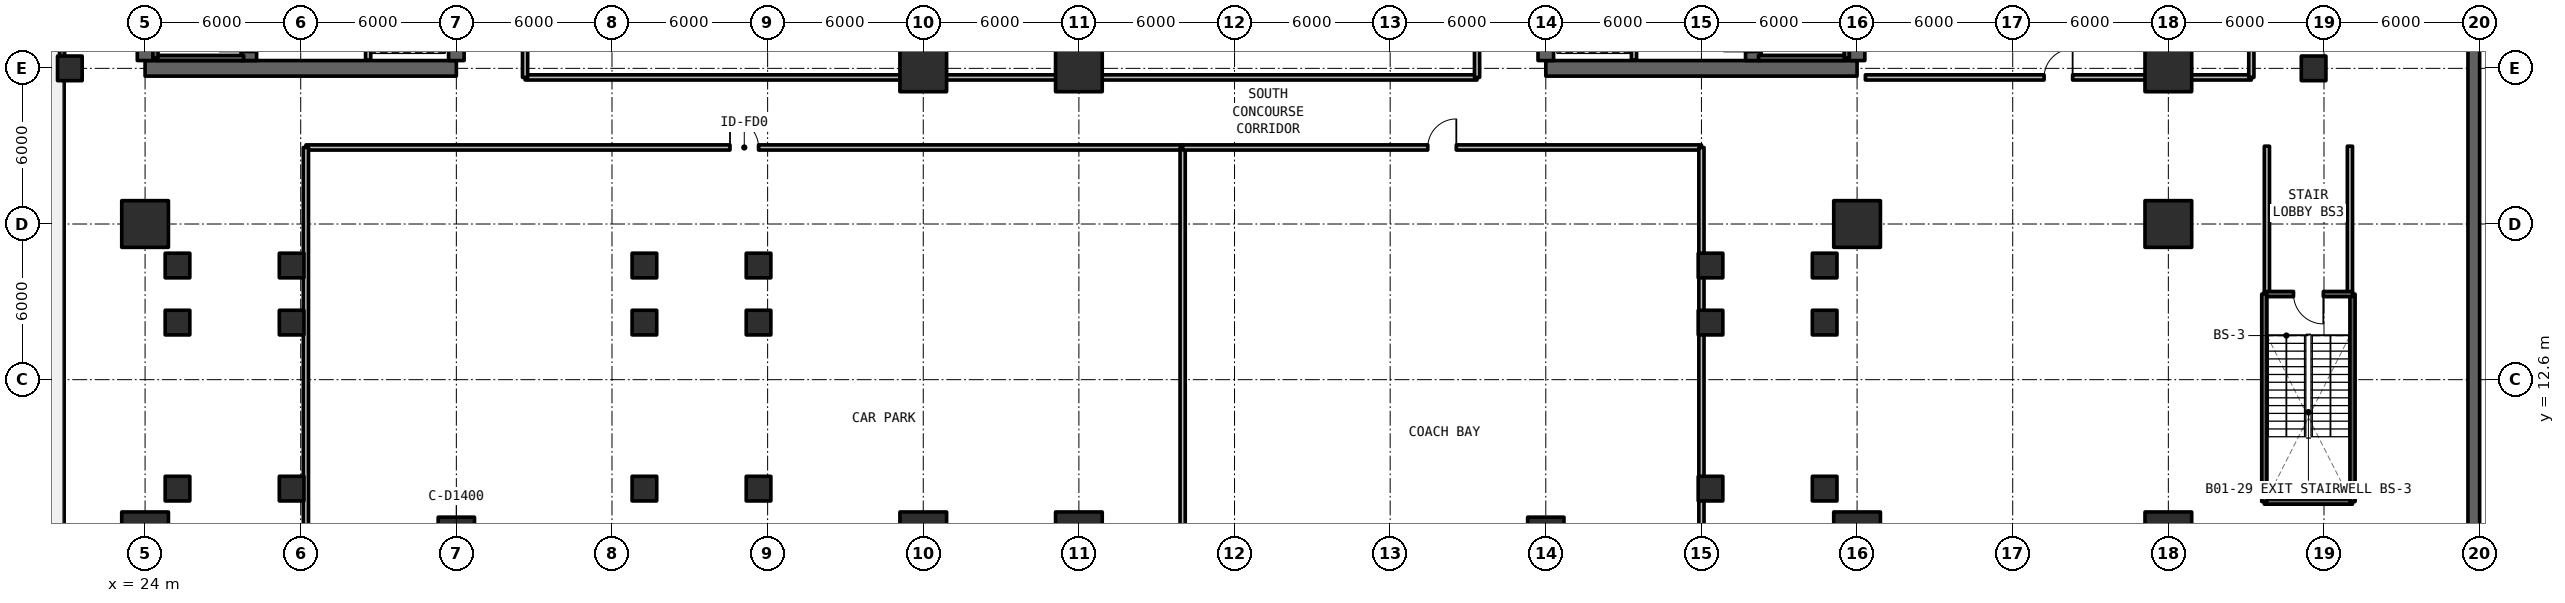
"""IFC4 building model, lengths in metres.
Left out: names, types, materials, properties, quantities, classifications, styles, units other than length and angle.
Written with IfcOpenShell. Run it as: python <this file> out.ifc"""

import sys

from ifc_helpers import new_model, si_unit, direction, frame, frame_2d, origin, origin_2d, place, context, subcontext, project, spatial, rectangle, circle, extrude, element, fill, save


model = new_model("IFC4")
c1 = context("Model", 3, precision=1e-05, world=origin(), true_north=direction((0.0, 1.0)))
c2 = subcontext(c1, "Body", "Model", "MODEL_VIEW")
j1 = project(units=[si_unit("LENGTHUNIT", "METRE"), si_unit("PLANEANGLEUNIT", "RADIAN")], contexts=[c1])
p1 = place(None, origin())
s1 = spatial("IfcSite", under=j1, at=p1, CompositionType="ELEMENT")
p2 = place(p1, origin())
s2 = spatial("IfcBuilding", under=s1, at=p2, CompositionType="ELEMENT")
p3 = place(p2, frame((0.0, 0.0, -4.62)))
s3 = spatial("IfcBuildingStorey", under=s2, at=p3, CompositionType="ELEMENT", Elevation=-4.62)
p4 = place(p3, frame((24.0, 24.6, 0.0), z_axis=(0.0, 0.0, 1.0), x_axis=(1.0, 0.0, 0.0)))
e1 = element("IfcWall", 1, at=p4, inside=s3, PredefinedType="SHEAR", context=c2, shape_type="SweptSolid", body=[
    extrude(rectangle(XDim=12.0, YDim=0.6, at=frame_2d((6.0, 0.0))), origin(), (0.0, 0.0, 1.0), 4.62),
])
p5 = place(p3, frame((24.0, 24.9, 0.0), z_axis=(0.0, 0.0, 1.0), x_axis=(0.0, 1.0, 0.0)))
e2 = element("IfcWall", 2, at=p5, inside=s3, PredefinedType="SHEAR", context=c2, shape_type="SweptSolid", body=[
    extrude(rectangle(XDim=17.4, YDim=0.6, at=frame_2d((8.7, 0.0))), origin(), (0.0, 0.0, 1.0), 4.62),
])
p6 = place(p3, frame((36.0, 24.9, 0.0), z_axis=(0.0, 0.0, 1.0), x_axis=(0.0, 1.0, 0.0)))
e3 = element("IfcWall", 3, at=p6, inside=s3, PredefinedType="SHEAR", context=c2, shape_type="SweptSolid", body=[
    extrude(rectangle(XDim=8.9, YDim=0.6, at=frame_2d((4.45, 0.0))), origin(), (0.0, 0.0, 1.0), 4.62),
])
p7 = place(p3, frame((28.0, 24.9, 0.0), z_axis=(0.0, 0.0, 1.0), x_axis=(0.0, 1.0, 0.0)))
e4 = element("IfcWall", 4, at=p7, inside=s3, PredefinedType="SHEAR", context=c2, shape_type="SweptSolid", body=[
    extrude(rectangle(XDim=17.4, YDim=0.6, at=frame_2d((8.7, 0.0))), origin(), (0.0, 0.0, 1.0), 4.62),
])
p8 = place(p7, frame((0.35, 0.0, 0.0)))
e5 = element("IfcOpeningElement", 5, at=p8, cuts=e4, PredefinedType="OPENING", context=c2, shape_type="SweptSolid", body=[
    extrude(rectangle(XDim=1.15, YDim=2.15, at=frame_2d((0.575, 1.075))), frame((0.0, 0.31, 0.0), z_axis=(0.0, -1.0, 0.0), x_axis=(1.0, 0.0, 0.0)), (0.0, 0.0, 1.0), 0.62),
])
p9 = place(p7, frame((9.55, 0.0, 0.0)))
e6 = element("IfcOpeningElement", 6, at=p9, cuts=e4, PredefinedType="OPENING", context=c2, shape_type="SweptSolid", body=[
    extrude(rectangle(XDim=1.15, YDim=2.15, at=frame_2d((0.575, 1.075))), frame((0.0, 0.31, 0.0), z_axis=(0.0, -1.0, 0.0), x_axis=(1.0, 0.0, 0.0)), (0.0, 0.0, 1.0), 0.62),
])
p10 = place(p3, frame((78.0, 24.6, 0.0), z_axis=(0.0, 0.0, 1.0), x_axis=(1.0, 0.0, 0.0)))
e7 = element("IfcWall", 7, at=p10, inside=s3, PredefinedType="SHEAR", context=c2, shape_type="SweptSolid", body=[
    extrude(rectangle(XDim=12.0, YDim=0.6, at=frame_2d((6.0, 0.0))), origin(), (0.0, 0.0, 1.0), 4.62),
])
p11 = place(p3, frame((90.0, 24.9, 0.0), z_axis=(0.0, 0.0, 1.0), x_axis=(0.0, 1.0, 0.0)))
e8 = element("IfcWall", 8, at=p11, inside=s3, PredefinedType="SHEAR", context=c2, shape_type="SweptSolid", body=[
    extrude(rectangle(XDim=17.4, YDim=0.6, at=frame_2d((8.7, 0.0))), origin(), (0.0, 0.0, 1.0), 4.62),
])
p12 = place(p3, frame((78.0, 24.9, 0.0), z_axis=(0.0, 0.0, 1.0), x_axis=(0.0, 1.0, 0.0)))
e9 = element("IfcWall", 9, at=p12, inside=s3, PredefinedType="SHEAR", context=c2, shape_type="SweptSolid", body=[
    extrude(rectangle(XDim=8.9, YDim=0.6, at=frame_2d((4.45, 0.0))), origin(), (0.0, 0.0, 1.0), 4.62),
])
p13 = place(p3, frame((86.0, 24.9, 0.0), z_axis=(0.0, 0.0, 1.0), x_axis=(0.0, 1.0, 0.0)))
e10 = element("IfcWall", 10, at=p13, inside=s3, PredefinedType="SHEAR", context=c2, shape_type="SweptSolid", body=[
    extrude(rectangle(XDim=17.4, YDim=0.6, at=frame_2d((8.7, 0.0))), origin(), (0.0, 0.0, 1.0), 4.62),
])
p14 = place(p13, frame((0.35, 0.0, 0.0)))
e11 = element("IfcOpeningElement", 11, at=p14, cuts=e10, PredefinedType="OPENING", context=c2, shape_type="SweptSolid", body=[
    extrude(rectangle(XDim=1.15, YDim=2.15, at=frame_2d((0.575, 1.075))), frame((0.0, 0.31, 0.0), z_axis=(0.0, -1.0, 0.0), x_axis=(1.0, 0.0, 0.0)), (0.0, 0.0, 1.0), 0.62),
])
p15 = place(p13, frame((9.55, 0.0, 0.0)))
e12 = element("IfcOpeningElement", 12, at=p15, cuts=e10, PredefinedType="OPENING", context=c2, shape_type="SweptSolid", body=[
    extrude(rectangle(XDim=1.15, YDim=2.15, at=frame_2d((0.575, 1.075))), frame((0.0, 0.31, 0.0), z_axis=(0.0, -1.0, 0.0), x_axis=(1.0, 0.0, 0.0)), (0.0, 0.0, 1.0), 0.62),
])
p16 = place(p3, frame((24.0, 6.6, 0.0), z_axis=(0.0, 0.0, 1.0), x_axis=(1.0, 0.0, 0.0)))
e13 = element("IfcColumn", 13, at=p16, inside=s3, PredefinedType="COLUMN", context=c2, shape_type="SweptSolid", body=[
    extrude(rectangle(XDim=1.8, YDim=1.8, at=origin_2d()), origin(), (0.0, 0.0, 1.0), 4.62),
])
p17 = place(p3, frame((36.0, 6.6, 0.0), z_axis=(0.0, 0.0, 1.0), x_axis=(1.0, 0.0, 0.0)))
e14 = element("IfcColumn", 14, at=p17, inside=s3, PredefinedType="COLUMN", context=c2, shape_type="SweptSolid", body=[
    extrude(circle(Radius=0.7, at=origin_2d()), origin(), (0.0, 0.0, 1.0), 4.62),
])
for number, where, z_axis, x_axis in (
    (15, (54.0, 6.6, 0.0), (0.0, 0.0, 1.0), (1.0, 0.0, 0.0)),
    (16, (54.0, 24.6, 0.0), (0.0, 0.0, 1.0), (1.0, 0.0, 0.0)),
    (17, (60.0, 6.6, 0.0), (0.0, 0.0, 1.0), (1.0, 0.0, 0.0)),
    (18, (60.0, 24.6, 0.0), (0.0, 0.0, 1.0), (1.0, 0.0, 0.0)),
):
    element("IfcColumn", number, at=place(p3, frame(where, z_axis=z_axis, x_axis=x_axis)), inside=s3, PredefinedType="COLUMN", context=c2, shape_type="SweptSolid", body=[
        extrude(rectangle(XDim=1.8, YDim=1.8, at=origin_2d()), origin(), (0.0, 0.0, 1.0), 4.62),
    ])
p18 = place(p3, frame((78.0, 6.6, 0.0), z_axis=(0.0, 0.0, 1.0), x_axis=(1.0, 0.0, 0.0)))
e19 = element("IfcColumn", 19, at=p18, inside=s3, PredefinedType="COLUMN", context=c2, shape_type="SweptSolid", body=[
    extrude(circle(Radius=0.7, at=origin_2d()), origin(), (0.0, 0.0, 1.0), 4.62),
])
for number, where, z_axis, x_axis in (
    (20, (90.0, 6.6, 0.0), (0.0, 0.0, 1.0), (1.0, 0.0, 0.0)),
    (21, (102.0, 6.6, 0.0), (0.0, 0.0, 1.0), (1.0, 0.0, 0.0)),
    (22, (102.0, 24.6, 0.0), (0.0, 0.0, 1.0), (1.0, 0.0, 0.0)),
    (23, (24.0, 18.6, 0.0), (0.0, 0.0, 1.0), (1.0, 0.0, 0.0)),
    (24, (90.0, 18.6, 0.0), (0.0, 0.0, 1.0), (1.0, 0.0, 0.0)),
    (25, (102.0, 18.6, 0.0), (0.0, 0.0, 1.0), (1.0, 0.0, 0.0)),
):
    element("IfcColumn", number, at=place(p3, frame(where, z_axis=z_axis, x_axis=x_axis)), inside=s3, PredefinedType="COLUMN", context=c2, shape_type="SweptSolid", body=[
        extrude(rectangle(XDim=1.8, YDim=1.8, at=origin_2d()), origin(), (0.0, 0.0, 1.0), 4.62),
    ])
for number, where, z_axis, x_axis in (
    (26, (107.6, 24.6, 0.0), (0.0, 0.0, 1.0), (1.0, 0.0, 0.0)),
    (27, (21.1, 24.6, 0.0), (0.0, 0.0, 1.0), (1.0, 0.0, 0.0)),
    (28, (25.25, 14.8, 0.0), (0.0, 0.0, 1.0), (1.0, 0.0, 0.0)),
    (29, (29.65, 14.8, 0.0), (0.0, 0.0, 1.0), (1.0, 0.0, 0.0)),
    (30, (25.25, 8.4, 0.0), (0.0, 0.0, 1.0), (1.0, 0.0, 0.0)),
    (31, (29.65, 8.4, 0.0), (0.0, 0.0, 1.0), (1.0, 0.0, 0.0)),
    (32, (29.65, 17.0, 0.0), (0.0, 0.0, 1.0), (1.0, 0.0, 0.0)),
    (33, (25.25, 17.0, 0.0), (0.0, 0.0, 1.0), (1.0, 0.0, 0.0)),
    (34, (43.25, 14.8, 0.0), (0.0, 0.0, 1.0), (1.0, 0.0, 0.0)),
    (35, (47.65, 14.8, 0.0), (0.0, 0.0, 1.0), (1.0, 0.0, 0.0)),
    (36, (43.25, 8.4, 0.0), (0.0, 0.0, 1.0), (1.0, 0.0, 0.0)),
    (37, (47.65, 8.4, 0.0), (0.0, 0.0, 1.0), (1.0, 0.0, 0.0)),
    (38, (47.65, 17.0, 0.0), (0.0, 0.0, 1.0), (1.0, 0.0, 0.0)),
    (39, (43.25, 17.0, 0.0), (0.0, 0.0, 1.0), (1.0, 0.0, 0.0)),
    (40, (84.35, 14.8, 0.0), (0.0, 0.0, 1.0), (1.0, 0.0, 0.0)),
    (41, (88.75, 14.8, 0.0), (0.0, 0.0, 1.0), (1.0, 0.0, 0.0)),
    (42, (84.35, 8.4, 0.0), (0.0, 0.0, 1.0), (1.0, 0.0, 0.0)),
    (43, (88.75, 8.4, 0.0), (0.0, 0.0, 1.0), (1.0, 0.0, 0.0)),
    (44, (88.75, 17.0, 0.0), (0.0, 0.0, 1.0), (1.0, 0.0, 0.0)),
    (45, (84.35, 17.0, 0.0), (0.0, 0.0, 1.0), (1.0, 0.0, 0.0)),
):
    element("IfcColumn", number, at=place(p3, frame(where, z_axis=z_axis, x_axis=x_axis)), inside=s3, PredefinedType="COLUMN", context=c2, shape_type="SweptSolid", body=[
        extrude(rectangle(XDim=0.95, YDim=0.95, at=origin_2d()), origin(), (0.0, 0.0, 1.0), 4.34),
    ])
p19 = place(p3, frame((113.775, 0.225, 0.0), z_axis=(0.0, 0.0, 1.0), x_axis=(0.0, 1.0, 0.0)))
e46 = element("IfcWall", 46, at=p19, inside=s3, PredefinedType="USERDEFINED", context=c2, shape_type="SweptSolid", body=[
    extrude(rectangle(XDim=66.75, YDim=0.45, at=frame_2d((33.375, 0.0))), origin(), (0.0, 0.0, 1.0), 4.34),
])
p20 = place(p3, frame((32.6, 24.92, 0.0), z_axis=(0.0, 0.0, 1.0), x_axis=(0.0, 1.0, 0.0)))
e47 = element("IfcWall", 47, at=p20, inside=s3, PredefinedType="SOLIDWALL", context=c2, shape_type="SweptSolid", body=[
    extrude(rectangle(XDim=3.58, YDim=0.2, at=frame_2d((1.79, 0.0))), origin(), (0.0, 0.0, 1.0), 3.56),
])
p21 = place(p20, frame((1.3, 0.0, 0.0)))
e48 = element("IfcOpeningElement", 48, at=p21, cuts=e47, PredefinedType="OPENING", context=c2, shape_type="SweptSolid", body=[
    extrude(rectangle(XDim=1.1, YDim=2.2, at=frame_2d((0.55, 1.1))), frame((0.0, 0.11, 0.0), z_axis=(0.0, -1.0, 0.0), x_axis=(1.0, 0.0, 0.0)), (0.0, 0.0, 1.0), 0.22),
])
p22 = place(p3, frame((81.4, 24.92, 0.0), z_axis=(0.0, 0.0, 1.0), x_axis=(0.0, 1.0, 0.0)))
e49 = element("IfcWall", 49, at=p22, inside=s3, PredefinedType="SOLIDWALL", context=c2, shape_type="SweptSolid", body=[
    extrude(rectangle(XDim=3.58, YDim=0.2, at=frame_2d((1.79, 0.0))), origin(), (0.0, 0.0, 1.0), 3.56),
])
p23 = place(p22, frame((1.3, 0.0, 0.0)))
e50 = element("IfcOpeningElement", 50, at=p23, cuts=e49, PredefinedType="OPENING", context=c2, shape_type="SweptSolid", body=[
    extrude(rectangle(XDim=1.1, YDim=2.2, at=frame_2d((0.55, 1.1))), frame((0.0, 0.11, 0.0), z_axis=(0.0, -1.0, 0.0), x_axis=(1.0, 0.0, 0.0)), (0.0, 0.0, 1.0), 0.22),
])
for number, where, z_axis, x_axis in (
    (51, (105.8, 15.9, 0.0), (0.0, 0.0, 1.0), (0.0, 1.0, 0.0)),
    (52, (109.0, 15.9, 0.0), (0.0, 0.0, 1.0), (0.0, 1.0, 0.0)),
):
    element("IfcWall", number, at=place(p3, frame(where, z_axis=z_axis, x_axis=x_axis)), inside=s3, PredefinedType="SOLIDWALL", context=c2, shape_type="SweptSolid", body=[
        extrude(rectangle(XDim=5.7, YDim=0.2, at=frame_2d((2.85, 0.0))), origin(), (0.0, 0.0, 1.0), 3.56),
    ])
p24 = place(p3, frame((30.2, 21.55, 0.0), z_axis=(0.0, 0.0, 1.0), x_axis=(1.0, 0.0, 0.0)))
e53 = element("IfcWall", 53, at=p24, inside=s3, PredefinedType="SOLIDWALL", context=c2, shape_type="SweptSolid", body=[
    extrude(rectangle(XDim=33.8, YDim=0.2, at=frame_2d((16.9, 0.0))), origin(), (0.0, 0.0, 1.0), 3.56),
])
p25 = place(p24, frame((16.35, 0.0, 0.0)))
e54 = element("IfcOpeningElement", 54, at=p25, cuts=e53, PredefinedType="OPENING", context=c2, shape_type="SweptSolid", body=[
    extrude(rectangle(XDim=1.1, YDim=2.15, at=frame_2d((0.55, 1.075))), frame((0.0, 0.11, 0.0), z_axis=(0.0, -1.0, 0.0), x_axis=(1.0, 0.0, 0.0)), (0.0, 0.0, 1.0), 0.22),
])
for number, where, z_axis, x_axis in (
    (55, (30.2, 0.45, 0.0), (0.0, 0.0, 1.0), (0.0, 1.0, 0.0)),
    (56, (64.0, 0.45, 0.0), (0.0, 0.0, 1.0), (0.0, 1.0, 0.0)),
):
    element("IfcWall", number, at=place(p3, frame(where, z_axis=z_axis, x_axis=x_axis)), inside=s3, PredefinedType="SOLIDWALL", context=c2, shape_type="SweptSolid", body=[
        extrude(rectangle(XDim=21.1, YDim=0.2, at=frame_2d((10.55, 0.0))), origin(), (0.0, 0.0, 1.0), 3.56),
    ])
p26 = place(p3, frame((64.0, 21.55, 0.0), z_axis=(0.0, 0.0, 1.0), x_axis=(1.0, 0.0, 0.0)))
e57 = element("IfcWall", 57, at=p26, inside=s3, PredefinedType="SOLIDWALL", context=c2, shape_type="SweptSolid", body=[
    extrude(rectangle(XDim=20.0, YDim=0.2, at=frame_2d((10.0, 0.0))), origin(), (0.0, 0.0, 1.0), 3.56),
])
p27 = place(p26, frame((9.45, 0.0, 0.0)))
e58 = element("IfcOpeningElement", 58, at=p27, cuts=e57, PredefinedType="OPENING", context=c2, shape_type="SweptSolid", body=[
    extrude(rectangle(XDim=1.1, YDim=2.15, at=frame_2d((0.55, 1.075))), frame((0.0, 0.11, 0.0), z_axis=(0.0, -1.0, 0.0), x_axis=(1.0, 0.0, 0.0)), (0.0, 0.0, 1.0), 0.22),
])
p28 = place(p3, frame((84.0, 0.45, 0.0), z_axis=(0.0, 0.0, 1.0), x_axis=(0.0, 1.0, 0.0)))
e59 = element("IfcWall", 59, at=p28, inside=s3, PredefinedType="SOLIDWALL", context=c2, shape_type="SweptSolid", body=[
    extrude(rectangle(XDim=21.1, YDim=0.2, at=frame_2d((10.55, 0.0))), origin(), (0.0, 0.0, 1.0), 3.56),
])
p29 = place(p3, frame((90.32, 24.25, 0.0), z_axis=(0.0, 0.0, 1.0), x_axis=(1.0, 0.0, 0.0)))
e60 = element("IfcWall", 60, at=p29, inside=s3, PredefinedType="SOLIDWALL", context=c2, shape_type="SweptSolid", body=[
    extrude(rectangle(XDim=14.88, YDim=0.2, at=frame_2d((7.44, 0.0))), origin(), (0.0, 0.0, 1.0), 3.56),
])
p30 = place(p29, frame((6.89, 0.0, 0.0)))
e61 = element("IfcOpeningElement", 61, at=p30, cuts=e60, PredefinedType="OPENING", context=c2, shape_type="SweptSolid", body=[
    extrude(rectangle(XDim=1.1, YDim=2.15, at=frame_2d((0.55, 1.075))), frame((0.0, 0.11, 0.0), z_axis=(0.0, -1.0, 0.0), x_axis=(1.0, 0.0, 0.0)), (0.0, 0.0, 1.0), 0.22),
])
p31 = place(p3, frame((105.2, 24.25, 0.0), z_axis=(0.0, 0.0, 1.0), x_axis=(0.0, 1.0, 0.0)))
e62 = element("IfcWall", 62, at=p31, inside=s3, PredefinedType="SOLIDWALL", context=c2, shape_type="SweptSolid", body=[
    extrude(rectangle(XDim=18.7, YDim=0.2, at=frame_2d((9.35, 0.0))), origin(), (0.0, 0.0, 1.0), 3.56),
])
p32 = place(p3, frame((38.65, 24.25, 0.0), z_axis=(0.0, 0.0, 1.0), x_axis=(1.0, 0.0, 0.0)))
e63 = element("IfcWall", 63, at=p32, inside=s3, PredefinedType="SOLIDWALL", context=c2, shape_type="SweptSolid", body=[
    extrude(rectangle(XDim=36.7, YDim=0.2, at=frame_2d((18.35, 0.0))), origin(), (0.0, 0.0, 1.0), 3.56),
])
p33 = place(p3, frame((38.65, 24.25, 0.0), z_axis=(0.0, 0.0, 1.0), x_axis=(0.0, 1.0, 0.0)))
e64 = element("IfcWall", 64, at=p33, inside=s3, PredefinedType="SOLIDWALL", context=c2, shape_type="SweptSolid", body=[
    extrude(rectangle(XDim=18.7, YDim=0.2, at=frame_2d((9.35, 0.0))), origin(), (0.0, 0.0, 1.0), 3.56),
])
p34 = place(p33, frame((8.45, 0.0, 0.0)))
e65 = element("IfcOpeningElement", 65, at=p34, cuts=e64, PredefinedType="OPENING", context=c2, shape_type="SweptSolid", body=[
    extrude(rectangle(XDim=1.1, YDim=2.15, at=frame_2d((0.55, 1.075))), frame((0.0, 0.11, 0.0), z_axis=(0.0, -1.0, 0.0), x_axis=(1.0, 0.0, 0.0)), (0.0, 0.0, 1.0), 0.22),
])
p35 = place(p3, frame((75.35, 24.25, 0.0), z_axis=(0.0, 0.0, 1.0), x_axis=(0.0, 1.0, 0.0)))
e66 = element("IfcWall", 66, at=p35, inside=s3, PredefinedType="SOLIDWALL", context=c2, shape_type="SweptSolid", body=[
    extrude(rectangle(XDim=18.7, YDim=0.2, at=frame_2d((9.35, 0.0))), origin(), (0.0, 0.0, 1.0), 3.56),
])
p36 = place(p3, frame((24.4, 25.0, 0.0), z_axis=(0.0, 0.0, 1.0), x_axis=(1.0, 0.0, 0.0)))
e67 = element("IfcWall", 67, at=p36, inside=s3, PredefinedType="SOLIDWALL", context=c2, shape_type="SweptSolid", body=[
    extrude(rectangle(XDim=3.4, YDim=0.2, at=frame_2d((1.7, 0.0))), origin(), (0.0, 0.0, 1.0), 4.62),
])
p37 = place(p3, frame((24.4, 33.0, 0.0), z_axis=(0.0, 0.0, 1.0), x_axis=(0.0, -1.0, 0.0)))
e68 = element("IfcWall", 68, at=p37, inside=s3, PredefinedType="SOLIDWALL", context=c2, shape_type="SweptSolid", body=[
    extrude(rectangle(XDim=8.0, YDim=0.2, at=frame_2d((4.0, 0.0))), origin(), (0.0, 0.0, 1.0), 4.62),
])
p38 = place(p3, frame((86.2, 25.0, 0.0), z_axis=(0.0, 0.0, 1.0), x_axis=(1.0, 0.0, 0.0)))
e69 = element("IfcWall", 69, at=p38, inside=s3, PredefinedType="SOLIDWALL", context=c2, shape_type="SweptSolid", body=[
    extrude(rectangle(XDim=3.4, YDim=0.2, at=frame_2d((1.7, 0.0))), origin(), (0.0, 0.0, 1.0), 4.62),
])
p39 = place(p3, frame((89.6, 25.0, 0.0), z_axis=(0.0, 0.0, 1.0), x_axis=(0.0, 1.0, 0.0)))
e70 = element("IfcWall", 70, at=p39, inside=s3, PredefinedType="SOLIDWALL", context=c2, shape_type="SweptSolid", body=[
    extrude(rectangle(XDim=8.0, YDim=0.2, at=frame_2d((4.0, 0.0))), origin(), (0.0, 0.0, 1.0), 4.62),
])
p40 = place(p3, frame((105.7, 7.9, 0.0), z_axis=(0.0, 0.0, 1.0), x_axis=(1.0, 0.0, 0.0)))
e71 = element("IfcWall", 71, at=p40, inside=s3, PredefinedType="SOLIDWALL", context=c2, shape_type="SweptSolid", body=[
    extrude(rectangle(XDim=3.4, YDim=0.2, at=frame_2d((1.7, 0.0))), origin(), (0.0, 0.0, 1.0), 4.62),
])
p41 = place(p3, frame((109.1, 7.9, 0.0), z_axis=(0.0, 0.0, 1.0), x_axis=(0.0, 1.0, 0.0)))
e72 = element("IfcWall", 72, at=p41, inside=s3, PredefinedType="SOLIDWALL", context=c2, shape_type="SweptSolid", body=[
    extrude(rectangle(XDim=8.0, YDim=0.2, at=frame_2d((4.0, 0.0))), origin(), (0.0, 0.0, 1.0), 4.62),
])
p42 = place(p3, frame((109.1, 15.9, 0.0), z_axis=(0.0, 0.0, 1.0), x_axis=(-1.0, 0.0, 0.0)))
e73 = element("IfcWall", 73, at=p42, inside=s3, PredefinedType="SOLIDWALL", context=c2, shape_type="SweptSolid", body=[
    extrude(rectangle(XDim=3.4, YDim=0.2, at=frame_2d((1.7, 0.0))), origin(), (0.0, 0.0, 1.0), 4.62),
])
p43 = place(p42, frame((1.125, 0.0, 0.0)))
e74 = element("IfcOpeningElement", 74, at=p43, cuts=e73, PredefinedType="OPENING", context=c2, shape_type="SweptSolid", body=[
    extrude(rectangle(XDim=1.15, YDim=2.15, at=frame_2d((0.575, 1.075))), frame((0.0, 0.11, 0.0), z_axis=(0.0, -1.0, 0.0), x_axis=(1.0, 0.0, 0.0)), (0.0, 0.0, 1.0), 0.22),
])
p44 = place(p3, frame((105.7, 15.9, 0.0), z_axis=(0.0, 0.0, 1.0), x_axis=(0.0, -1.0, 0.0)))
e75 = element("IfcWall", 75, at=p44, inside=s3, PredefinedType="SOLIDWALL", context=c2, shape_type="SweptSolid", body=[
    extrude(rectangle(XDim=8.0, YDim=0.2, at=frame_2d((4.0, 0.0))), origin(), (0.0, 0.0, 1.0), 4.62),
])
p45 = place(p3, frame((20.8, 24.8, 0.0), z_axis=(0.0, 0.0, 1.0), x_axis=(0.0, 1.0, 0.0)))
e76 = element("IfcWall", 76, at=p45, inside=s3, PredefinedType="SOLIDWALL", context=c2, shape_type="SweptSolid", body=[
    extrude(rectangle(XDim=5.6, YDim=0.2, at=frame_2d((2.8, 0.0))), origin(), (0.0, 0.0, 1.0), 4.37),
])
p46 = place(p25, origin())
e77 = element("IfcDoor", 77, at=p46, inside=s3, OperationType="SINGLE_SWING_LEFT", PredefinedType="DOOR", context=c2, shape_type="SweptSolid", body=[
    extrude(rectangle(XDim=1.1, YDim=2.15, at=frame_2d((0.55, 1.075))), frame((0.0, 0.025, 0.0), z_axis=(0.0, -1.0, 0.0), x_axis=(1.0, 0.0, 0.0)), (0.0, 0.0, 1.0), 0.05),
])
fill(e54, e77)
p47 = place(p27, origin())
e78 = element("IfcDoor", 78, at=p47, inside=s3, OperationType="SINGLE_SWING_RIGHT", PredefinedType="DOOR", context=c2, shape_type="SweptSolid", body=[
    extrude(rectangle(XDim=1.1, YDim=2.15, at=frame_2d((0.55, 1.075))), frame((0.0, 0.025, 0.0), z_axis=(0.0, -1.0, 0.0), x_axis=(1.0, 0.0, 0.0)), (0.0, 0.0, 1.0), 0.05),
])
fill(e58, e78)
p48 = place(p30, origin())
e79 = element("IfcDoor", 79, at=p48, inside=s3, OperationType="SINGLE_SWING_RIGHT", PredefinedType="DOOR", context=c2, shape_type="SweptSolid", body=[
    extrude(rectangle(XDim=1.1, YDim=2.15, at=frame_2d((0.55, 1.075))), frame((0.0, 0.025, 0.0), z_axis=(0.0, -1.0, 0.0), x_axis=(1.0, 0.0, 0.0)), (0.0, 0.0, 1.0), 0.05),
])
fill(e61, e79)
p49 = place(p43, origin())
e80 = element("IfcDoor", 80, at=p49, inside=s3, OperationType="SINGLE_SWING_RIGHT", PredefinedType="DOOR", context=c2, shape_type="SweptSolid", body=[
    extrude(rectangle(XDim=1.15, YDim=2.15, at=frame_2d((0.575, 1.075))), frame((0.0, 0.025, 0.0), z_axis=(0.0, -1.0, 0.0), x_axis=(1.0, 0.0, 0.0)), (0.0, 0.0, 1.0), 0.05),
])
fill(e74, e80)
save(model, sys.argv[1])
